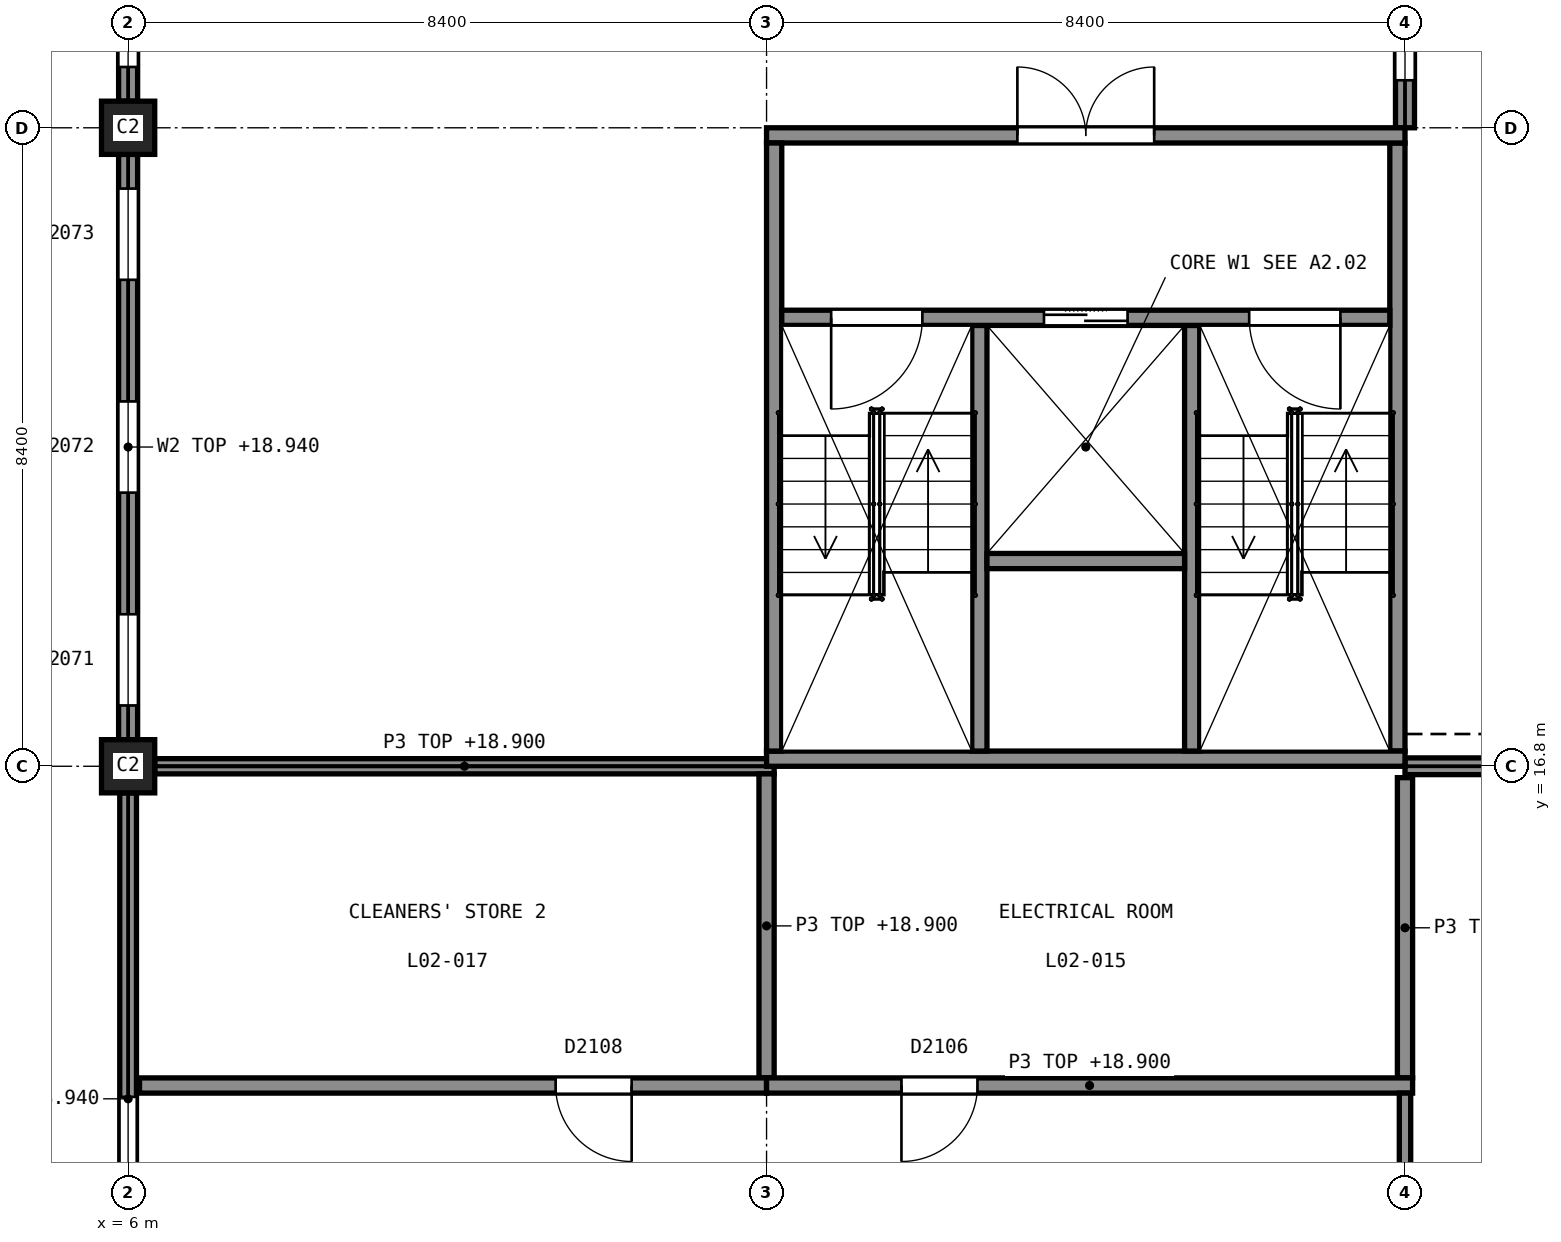
"""IFC4 building model, lengths in metres.
Left out: names, types, materials, properties, quantities, classifications, styles, units other than length and angle.
Written with IfcOpenShell. Run it as: python <this file> out.ifc"""

import sys

from ifc_helpers import new_model, si_unit, direction, frame, frame_2d, origin, origin_2d, place, context, subcontext, project, spatial, rectangle, extrude, element, fill, save


model = new_model("IFC4")
c1 = context("Model", 3, precision=1e-05, world=origin(), true_north=direction((0.0, 1.0)))
c2 = subcontext(c1, "Body", "Model", "MODEL_VIEW")
j1 = project(units=[si_unit("LENGTHUNIT", "METRE"), si_unit("PLANEANGLEUNIT", "RADIAN")], contexts=[c1])
p1 = place(None, origin())
s1 = spatial("IfcSite", under=j1, at=p1, CompositionType="ELEMENT")
p2 = place(p1, origin())
s2 = spatial("IfcBuilding", under=s1, at=p2, CompositionType="ELEMENT")
p3 = place(p2, frame((0.0, 0.0, 10.5)))
s3 = spatial("IfcBuildingStorey", under=s2, at=p3, CompositionType="ELEMENT", Elevation=10.5)
p4 = place(p3, frame((14.4, 16.9, 0.0), z_axis=(0.0, 0.0, 1.0), x_axis=(1.0, 0.0, 0.0)))
e1 = element("IfcWall", 1, at=p4, inside=s3, PredefinedType="SHEAR", context=c2, shape_type="SweptSolid", body=[
    extrude(rectangle(XDim=8.4, YDim=0.2, at=frame_2d((4.2, 0.0))), origin(), (0.0, 0.0, 1.0), 9.5),
])
p5 = place(p3, frame((14.4, 25.1, 0.0), z_axis=(0.0, 0.0, 1.0), x_axis=(1.0, 0.0, 0.0)))
e2 = element("IfcWall", 2, at=p5, inside=s3, PredefinedType="SHEAR", context=c2, shape_type="SweptSolid", body=[
    extrude(rectangle(XDim=8.4, YDim=0.2, at=frame_2d((4.2, 0.0))), origin(), (0.0, 0.0, 1.0), 9.5),
])
p6 = place(p5, frame((3.3, 0.0, 0.0)))
e3 = element("IfcOpeningElement", 3, at=p6, cuts=e2, PredefinedType="OPENING", context=c2, shape_type="SweptSolid", body=[
    extrude(rectangle(XDim=1.8, YDim=2.1, at=frame_2d((0.9, 1.05))), frame((0.0, 0.11, 0.0), z_axis=(0.0, -1.0, 0.0), x_axis=(1.0, 0.0, 0.0)), (0.0, 0.0, 1.0), 0.22),
])
for number, where, z_axis, x_axis in (
    (4, (14.5, 17.0, 0.0), (0.0, 0.0, 1.0), (0.0, 1.0, 0.0)),
    (5, (22.7, 17.0, 0.0), (0.0, 0.0, 1.0), (0.0, 1.0, 0.0)),
):
    element("IfcWall", number, at=place(p3, frame(where, z_axis=z_axis, x_axis=x_axis)), inside=s3, PredefinedType="SHEAR", context=c2, shape_type="SweptSolid", body=[
        extrude(rectangle(XDim=8.0, YDim=0.2, at=frame_2d((4.0, 0.0))), origin(), (0.0, 0.0, 1.0), 9.5),
    ])
p7 = place(p3, frame((14.6, 22.7, 0.0), z_axis=(0.0, 0.0, 1.0), x_axis=(1.0, 0.0, 0.0)))
e6 = element("IfcWall", 6, at=p7, inside=s3, PredefinedType="SHEAR", context=c2, shape_type="SweptSolid", body=[
    extrude(rectangle(XDim=8.0, YDim=0.2, at=frame_2d((4.0, 0.0))), origin(), (0.0, 0.0, 1.0), 9.5),
])
p8 = place(p7, frame((0.65, 0.0, 0.0)))
e7 = element("IfcOpeningElement", 7, at=p8, cuts=e6, PredefinedType="OPENING", context=c2, shape_type="SweptSolid", body=[
    extrude(rectangle(XDim=1.2, YDim=2.1, at=frame_2d((0.6, 1.05))), frame((0.0, 0.11, 0.0), z_axis=(0.0, -1.0, 0.0), x_axis=(1.0, 0.0, 0.0)), (0.0, 0.0, 1.0), 0.22),
])
p9 = place(p7, frame((6.15, 0.0, 0.0)))
e8 = element("IfcOpeningElement", 8, at=p9, cuts=e6, PredefinedType="OPENING", context=c2, shape_type="SweptSolid", body=[
    extrude(rectangle(XDim=1.2, YDim=2.1, at=frame_2d((0.6, 1.05))), frame((0.0, 0.11, 0.0), z_axis=(0.0, -1.0, 0.0), x_axis=(1.0, 0.0, 0.0)), (0.0, 0.0, 1.0), 0.22),
])
p10 = place(p7, frame((3.45, 0.0, 0.0)))
e9 = element("IfcOpeningElement", 9, at=p10, cuts=e6, PredefinedType="OPENING", context=c2, shape_type="SweptSolid", body=[
    extrude(rectangle(XDim=1.1, YDim=2.1, at=frame_2d((0.55, 1.05))), frame((0.0, 0.11, 0.0), z_axis=(0.0, -1.0, 0.0), x_axis=(1.0, 0.0, 0.0)), (0.0, 0.0, 1.0), 0.22),
])
for number, where, z_axis, x_axis in (
    (10, (17.2, 17.0, 0.0), (0.0, 0.0, 1.0), (0.0, 1.0, 0.0)),
    (11, (20.0, 17.0, 0.0), (0.0, 0.0, 1.0), (0.0, 1.0, 0.0)),
):
    element("IfcWall", number, at=place(p3, frame(where, z_axis=z_axis, x_axis=x_axis)), inside=s3, PredefinedType="SHEAR", context=c2, shape_type="SweptSolid", body=[
        extrude(rectangle(XDim=5.6, YDim=0.2, at=frame_2d((2.8, 0.0))), origin(), (0.0, 0.0, 1.0), 9.5),
    ])
p11 = place(p3, frame((17.3, 19.5, 0.0), z_axis=(0.0, 0.0, 1.0), x_axis=(1.0, 0.0, 0.0)))
e12 = element("IfcWall", 12, at=p11, inside=s3, PredefinedType="SHEAR", context=c2, shape_type="SweptSolid", body=[
    extrude(rectangle(XDim=2.6, YDim=0.2, at=frame_2d((1.3, 0.0))), origin(), (0.0, 0.0, 1.0), 9.5),
])
for number, where, z_axis, x_axis in (
    (13, (6.0, 16.8, 0.0), (0.0, 0.0, 1.0), (1.0, 0.0, 0.0)),
    (14, (6.0, 25.2, 0.0), (0.0, 0.0, 1.0), (1.0, 0.0, 0.0)),
):
    element("IfcColumn", number, at=place(p3, frame(where, z_axis=z_axis, x_axis=x_axis)), inside=s3, PredefinedType="COLUMN", context=c2, shape_type="SweptSolid", body=[
        extrude(rectangle(XDim=0.7, YDim=0.7, at=origin_2d()), origin(), (0.0, 0.0, 1.0), 9.5),
    ])
p12 = place(p3, frame((22.8, 16.8, 0.0), z_axis=(0.0, 0.0, 1.0), x_axis=(1.0, 0.0, 0.0)))
e15 = element("IfcWall", 15, at=p12, inside=s3, PredefinedType="SOLIDWALL", context=c2, shape_type="SweptSolid", body=[
    extrude(rectangle(XDim=8.05, YDim=0.22, at=frame_2d((4.025, 0.0))), origin(), (0.0, 0.0, 1.0), 8.44),
])
p13 = place(p12, frame((2.225, 0.0, 0.9)))
e16 = element("IfcOpeningElement", 16, at=p13, cuts=e15, PredefinedType="OPENING", context=c2, shape_type="SweptSolid", body=[
    extrude(rectangle(XDim=3.6, YDim=1.5, at=frame_2d((1.8, 0.75))), frame((0.0, 0.12, 0.0), z_axis=(0.0, -1.0, 0.0), x_axis=(1.0, 0.0, 0.0)), (0.0, 0.0, 1.0), 0.24),
])
p14 = place(p3, frame((22.8, 25.2, 0.0), z_axis=(0.0, 0.0, 1.0), x_axis=(0.0, 1.0, 0.0)))
e17 = element("IfcWall", 17, at=p14, inside=s3, PredefinedType="SOLIDWALL", context=c2, shape_type="SweptSolid", body=[
    extrude(rectangle(XDim=8.05, YDim=0.25, at=frame_2d((4.025, 0.0))), origin(), (0.0, 0.0, 1.0), 8.44),
])
p15 = place(p14, frame((0.625, 0.0, 0.9)))
e18 = element("IfcOpeningElement", 18, at=p15, cuts=e17, PredefinedType="OPENING", context=c2, shape_type="SweptSolid", body=[
    extrude(rectangle(XDim=1.2, YDim=6.0, at=frame_2d((0.6, 3.0))), frame((0.0, 0.135, 0.0), z_axis=(0.0, -1.0, 0.0), x_axis=(1.0, 0.0, 0.0)), (0.0, 0.0, 1.0), 0.27),
])
p16 = place(p14, frame((3.425, 0.0, 0.9)))
e19 = element("IfcOpeningElement", 19, at=p16, cuts=e17, PredefinedType="OPENING", context=c2, shape_type="SweptSolid", body=[
    extrude(rectangle(XDim=1.2, YDim=6.0, at=frame_2d((0.6, 3.0))), frame((0.0, 0.135, 0.0), z_axis=(0.0, -1.0, 0.0), x_axis=(1.0, 0.0, 0.0)), (0.0, 0.0, 1.0), 0.27),
])
p17 = place(p14, frame((6.225, 0.0, 0.9)))
e20 = element("IfcOpeningElement", 20, at=p17, cuts=e17, PredefinedType="OPENING", context=c2, shape_type="SweptSolid", body=[
    extrude(rectangle(XDim=1.2, YDim=6.0, at=frame_2d((0.6, 3.0))), frame((0.0, 0.135, 0.0), z_axis=(0.0, -1.0, 0.0), x_axis=(1.0, 0.0, 0.0)), (0.0, 0.0, 1.0), 0.27),
])
p18 = place(p3, frame((6.0, 25.55, 0.0), z_axis=(0.0, 0.0, 1.0), x_axis=(0.0, 1.0, 0.0)))
e21 = element("IfcWall", 21, at=p18, inside=s3, PredefinedType="SOLIDWALL", context=c2, shape_type="SweptSolid", body=[
    extrude(rectangle(XDim=7.7, YDim=0.25, at=frame_2d((3.85, 0.0))), origin(), (0.0, 0.0, 1.0), 8.44),
])
p19 = place(p18, frame((0.45, 0.0, 0.9)))
e22 = element("IfcOpeningElement", 22, at=p19, cuts=e21, PredefinedType="OPENING", context=c2, shape_type="SweptSolid", body=[
    extrude(rectangle(XDim=1.2, YDim=6.0, at=frame_2d((0.6, 3.0))), frame((0.0, 0.135, 0.0), z_axis=(0.0, -1.0, 0.0), x_axis=(1.0, 0.0, 0.0)), (0.0, 0.0, 1.0), 0.27),
])
p20 = place(p18, frame((3.25, 0.0, 0.9)))
e23 = element("IfcOpeningElement", 23, at=p20, cuts=e21, PredefinedType="OPENING", context=c2, shape_type="SweptSolid", body=[
    extrude(rectangle(XDim=1.2, YDim=6.0, at=frame_2d((0.6, 3.0))), frame((0.0, 0.135, 0.0), z_axis=(0.0, -1.0, 0.0), x_axis=(1.0, 0.0, 0.0)), (0.0, 0.0, 1.0), 0.27),
])
p21 = place(p18, frame((6.05, 0.0, 0.9)))
e24 = element("IfcOpeningElement", 24, at=p21, cuts=e21, PredefinedType="OPENING", context=c2, shape_type="SweptSolid", body=[
    extrude(rectangle(XDim=1.2, YDim=6.0, at=frame_2d((0.6, 3.0))), frame((0.0, 0.135, 0.0), z_axis=(0.0, -1.0, 0.0), x_axis=(1.0, 0.0, 0.0)), (0.0, 0.0, 1.0), 0.27),
])
p22 = place(p3, frame((6.0, 17.15, 0.0), z_axis=(0.0, 0.0, 1.0), x_axis=(0.0, 1.0, 0.0)))
e25 = element("IfcWall", 25, at=p22, inside=s3, PredefinedType="SOLIDWALL", context=c2, shape_type="SweptSolid", body=[
    extrude(rectangle(XDim=7.7, YDim=0.25, at=frame_2d((3.85, 0.0))), origin(), (0.0, 0.0, 1.0), 8.44),
])
p23 = place(p22, frame((0.45, 0.0, 0.9)))
e26 = element("IfcOpeningElement", 26, at=p23, cuts=e25, PredefinedType="OPENING", context=c2, shape_type="SweptSolid", body=[
    extrude(rectangle(XDim=1.2, YDim=6.0, at=frame_2d((0.6, 3.0))), frame((0.0, 0.135, 0.0), z_axis=(0.0, -1.0, 0.0), x_axis=(1.0, 0.0, 0.0)), (0.0, 0.0, 1.0), 0.27),
])
p24 = place(p22, frame((3.25, 0.0, 0.9)))
e27 = element("IfcOpeningElement", 27, at=p24, cuts=e25, PredefinedType="OPENING", context=c2, shape_type="SweptSolid", body=[
    extrude(rectangle(XDim=1.2, YDim=6.0, at=frame_2d((0.6, 3.0))), frame((0.0, 0.135, 0.0), z_axis=(0.0, -1.0, 0.0), x_axis=(1.0, 0.0, 0.0)), (0.0, 0.0, 1.0), 0.27),
])
p25 = place(p22, frame((6.05, 0.0, 0.9)))
e28 = element("IfcOpeningElement", 28, at=p25, cuts=e25, PredefinedType="OPENING", context=c2, shape_type="SweptSolid", body=[
    extrude(rectangle(XDim=1.2, YDim=6.0, at=frame_2d((0.6, 3.0))), frame((0.0, 0.135, 0.0), z_axis=(0.0, -1.0, 0.0), x_axis=(1.0, 0.0, 0.0)), (0.0, 0.0, 1.0), 0.27),
])
p26 = place(p3, frame((6.0, 8.4, 0.0), z_axis=(0.0, 0.0, 1.0), x_axis=(0.0, 1.0, 0.0)))
e29 = element("IfcWall", 29, at=p26, inside=s3, PredefinedType="SOLIDWALL", context=c2, shape_type="SweptSolid", body=[
    extrude(rectangle(XDim=8.05, YDim=0.22, at=frame_2d((4.025, 0.0))), origin(), (0.0, 0.0, 1.0), 8.44),
])
p27 = place(p26, frame((0.45, 0.0, 0.9)))
e30 = element("IfcOpeningElement", 30, at=p27, cuts=e29, PredefinedType="OPENING", context=c2, shape_type="SweptSolid", body=[
    extrude(rectangle(XDim=3.6, YDim=1.5, at=frame_2d((1.8, 0.75))), frame((0.0, 0.12, 0.0), z_axis=(0.0, -1.0, 0.0), x_axis=(1.0, 0.0, 0.0)), (0.0, 0.0, 1.0), 0.24),
])
p28 = place(p3, frame((6.35, 16.8, 0.0), z_axis=(0.0, 0.0, 1.0), x_axis=(1.0, 0.0, 0.0)))
e31 = element("IfcWall", 31, at=p28, inside=s3, PredefinedType="PARTITIONING", context=c2, shape_type="SweptSolid", body=[
    extrude(rectangle(XDim=8.15, YDim=0.2, at=frame_2d((4.075, 0.0))), origin(), (0.0, 0.0, 1.0), 8.4),
])
p29 = place(p3, frame((14.4, 12.7, 0.0), z_axis=(0.0, 0.0, 1.0), x_axis=(0.0, 1.0, 0.0)))
e32 = element("IfcWall", 32, at=p29, inside=s3, PredefinedType="PARTITIONING", context=c2, shape_type="SweptSolid", body=[
    extrude(rectangle(XDim=4.0, YDim=0.2, at=frame_2d((2.0, 0.0))), origin(), (0.0, 0.0, 1.0), 8.4),
])
p30 = place(p3, frame((22.8, 12.7, 0.0), z_axis=(0.0, 0.0, 1.0), x_axis=(0.0, 1.0, 0.0)))
e33 = element("IfcWall", 33, at=p30, inside=s3, PredefinedType="PARTITIONING", context=c2, shape_type="SweptSolid", body=[
    extrude(rectangle(XDim=3.95, YDim=0.2, at=frame_2d((1.975, 0.0))), origin(), (0.0, 0.0, 1.0), 8.4),
])
p31 = place(p3, frame((6.15, 12.6, 0.0), z_axis=(0.0, 0.0, 1.0), x_axis=(1.0, 0.0, 0.0)))
e34 = element("IfcWall", 34, at=p31, inside=s3, PredefinedType="PARTITIONING", context=c2, shape_type="SweptSolid", body=[
    extrude(rectangle(XDim=8.25, YDim=0.2, at=frame_2d((4.125, 0.0))), origin(), (0.0, 0.0, 1.0), 8.4),
])
p32 = place(p31, frame((5.475, 0.0, 0.0)))
e35 = element("IfcOpeningElement", 35, at=p32, cuts=e34, PredefinedType="OPENING", context=c2, shape_type="SweptSolid", body=[
    extrude(rectangle(XDim=1.0, YDim=2.1, at=frame_2d((0.5, 1.05))), frame((0.0, 0.11, 0.0), z_axis=(0.0, -1.0, 0.0), x_axis=(1.0, 0.0, 0.0)), (0.0, 0.0, 1.0), 0.22),
])
p33 = place(p3, frame((14.4, 12.6, 0.0), z_axis=(0.0, 0.0, 1.0), x_axis=(1.0, 0.0, 0.0)))
e36 = element("IfcWall", 36, at=p33, inside=s3, PredefinedType="PARTITIONING", context=c2, shape_type="SweptSolid", body=[
    extrude(rectangle(XDim=8.5, YDim=0.2, at=frame_2d((4.25, 0.0))), origin(), (0.0, 0.0, 1.0), 8.4),
])
p34 = place(p33, frame((1.775, 0.0, 0.0)))
e37 = element("IfcOpeningElement", 37, at=p34, cuts=e36, PredefinedType="OPENING", context=c2, shape_type="SweptSolid", body=[
    extrude(rectangle(XDim=1.0, YDim=2.1, at=frame_2d((0.5, 1.05))), frame((0.0, 0.11, 0.0), z_axis=(0.0, -1.0, 0.0), x_axis=(1.0, 0.0, 0.0)), (0.0, 0.0, 1.0), 0.22),
])
p35 = place(p3, frame((22.8, 8.75, 0.0), z_axis=(0.0, 0.0, 1.0), x_axis=(0.0, 1.0, 0.0)))
e38 = element("IfcWall", 38, at=p35, inside=s3, PredefinedType="PARTITIONING", context=c2, shape_type="SweptSolid", body=[
    extrude(rectangle(XDim=3.75, YDim=0.15, at=frame_2d((1.875, 0.0))), origin(), (0.0, 0.0, 1.0), 8.4),
])
p36 = place(p15, origin())
e39 = element("IfcWindow", 39, at=p36, inside=s3, PartitioningType="SINGLE_PANEL", PredefinedType="WINDOW", context=c2, shape_type="SweptSolid", body=[
    extrude(rectangle(XDim=1.2, YDim=6.0, at=frame_2d((0.6, 3.0))), frame((0.0, 0.105, 0.0), z_axis=(0.0, -1.0, 0.0), x_axis=(1.0, 0.0, 0.0)), (0.0, 0.0, 1.0), 0.06),
])
fill(e18, e39)
p37 = place(p19, origin())
e40 = element("IfcWindow", 40, at=p37, inside=s3, PartitioningType="SINGLE_PANEL", PredefinedType="WINDOW", context=c2, shape_type="SweptSolid", body=[
    extrude(rectangle(XDim=1.2, YDim=6.0, at=frame_2d((0.6, 3.0))), frame((0.0, -0.045, 0.0), z_axis=(0.0, -1.0, 0.0), x_axis=(1.0, 0.0, 0.0)), (0.0, 0.0, 1.0), 0.06),
])
fill(e22, e40)
p38 = place(p23, origin())
e41 = element("IfcWindow", 41, at=p38, inside=s3, PartitioningType="SINGLE_PANEL", PredefinedType="WINDOW", context=c2, shape_type="SweptSolid", body=[
    extrude(rectangle(XDim=1.2, YDim=6.0, at=frame_2d((0.6, 3.0))), frame((0.0, -0.045, 0.0), z_axis=(0.0, -1.0, 0.0), x_axis=(1.0, 0.0, 0.0)), (0.0, 0.0, 1.0), 0.06),
])
fill(e26, e41)
p39 = place(p24, origin())
e42 = element("IfcWindow", 42, at=p39, inside=s3, PartitioningType="SINGLE_PANEL", PredefinedType="WINDOW", context=c2, shape_type="SweptSolid", body=[
    extrude(rectangle(XDim=1.2, YDim=6.0, at=frame_2d((0.6, 3.0))), frame((0.0, -0.045, 0.0), z_axis=(0.0, -1.0, 0.0), x_axis=(1.0, 0.0, 0.0)), (0.0, 0.0, 1.0), 0.06),
])
fill(e27, e42)
p40 = place(p25, origin())
e43 = element("IfcWindow", 43, at=p40, inside=s3, PartitioningType="SINGLE_PANEL", PredefinedType="WINDOW", context=c2, shape_type="SweptSolid", body=[
    extrude(rectangle(XDim=1.2, YDim=6.0, at=frame_2d((0.6, 3.0))), frame((0.0, -0.045, 0.0), z_axis=(0.0, -1.0, 0.0), x_axis=(1.0, 0.0, 0.0)), (0.0, 0.0, 1.0), 0.06),
])
fill(e28, e43)
p41 = place(p27, origin())
e44 = element("IfcWindow", 44, at=p41, inside=s3, PartitioningType="DOUBLE_PANEL_VERTICAL", PredefinedType="WINDOW", context=c2, shape_type="SweptSolid", body=[
    extrude(rectangle(XDim=3.6, YDim=1.5, at=frame_2d((1.8, 0.75))), frame((0.0, -0.03, 0.0), z_axis=(0.0, -1.0, 0.0), x_axis=(1.0, 0.0, 0.0)), (0.0, 0.0, 1.0), 0.06),
])
fill(e30, e44)
p42 = place(p34, origin())
e45 = element("IfcDoor", 45, at=p42, inside=s3, OperationType="SINGLE_SWING_LEFT", PredefinedType="DOOR", context=c2, shape_type="SweptSolid", body=[
    extrude(rectangle(XDim=1.0, YDim=2.1, at=frame_2d((0.5, 1.05))), frame((0.0, 0.025, 0.0), z_axis=(0.0, -1.0, 0.0), x_axis=(1.0, 0.0, 0.0)), (0.0, 0.0, 1.0), 0.05),
])
fill(e37, e45)
p43 = place(p32, origin())
e46 = element("IfcDoor", 46, at=p43, inside=s3, OperationType="SINGLE_SWING_RIGHT", PredefinedType="DOOR", context=c2, shape_type="SweptSolid", body=[
    extrude(rectangle(XDim=1.0, YDim=2.1, at=frame_2d((0.5, 1.05))), frame((0.0, 0.025, 0.0), z_axis=(0.0, -1.0, 0.0), x_axis=(1.0, 0.0, 0.0)), (0.0, 0.0, 1.0), 0.05),
])
fill(e35, e46)
p44 = place(p6, origin())
e47 = element("IfcDoor", 47, at=p44, inside=s3, OperationType="DOUBLE_DOOR_SINGLE_SWING", PredefinedType="DOOR", context=c2, shape_type="SweptSolid", body=[
    extrude(rectangle(XDim=1.8, YDim=2.1, at=frame_2d((0.9, 1.05))), frame((0.0, 0.025, 0.0), z_axis=(0.0, -1.0, 0.0), x_axis=(1.0, 0.0, 0.0)), (0.0, 0.0, 1.0), 0.05),
])
fill(e3, e47)
p45 = place(p8, origin())
e48 = element("IfcDoor", 48, at=p45, inside=s3, OperationType="SINGLE_SWING_LEFT", PredefinedType="DOOR", context=c2, shape_type="SweptSolid", body=[
    extrude(rectangle(XDim=1.2, YDim=2.1, at=frame_2d((0.6, 1.05))), frame((0.0, 0.025, 0.0), z_axis=(0.0, -1.0, 0.0), x_axis=(1.0, 0.0, 0.0)), (0.0, 0.0, 1.0), 0.05),
])
fill(e7, e48)
p46 = place(p9, origin())
e49 = element("IfcDoor", 49, at=p46, inside=s3, OperationType="SINGLE_SWING_RIGHT", PredefinedType="DOOR", context=c2, shape_type="SweptSolid", body=[
    extrude(rectangle(XDim=1.2, YDim=2.1, at=frame_2d((0.6, 1.05))), frame((0.0, 0.025, 0.0), z_axis=(0.0, -1.0, 0.0), x_axis=(1.0, 0.0, 0.0)), (0.0, 0.0, 1.0), 0.05),
])
fill(e8, e49)
p47 = place(p10, origin())
e50 = element("IfcDoor", 50, at=p47, inside=s3, OperationType="DOUBLE_DOOR_SLIDING", PredefinedType="DOOR", context=c2, shape_type="SweptSolid", body=[
    extrude(rectangle(XDim=1.1, YDim=2.1, at=frame_2d((0.55, 1.05))), frame((0.0, 0.025, 0.0), z_axis=(0.0, -1.0, 0.0), x_axis=(1.0, 0.0, 0.0)), (0.0, 0.0, 1.0), 0.05),
])
fill(e9, e50)
save(model, sys.argv[1])
